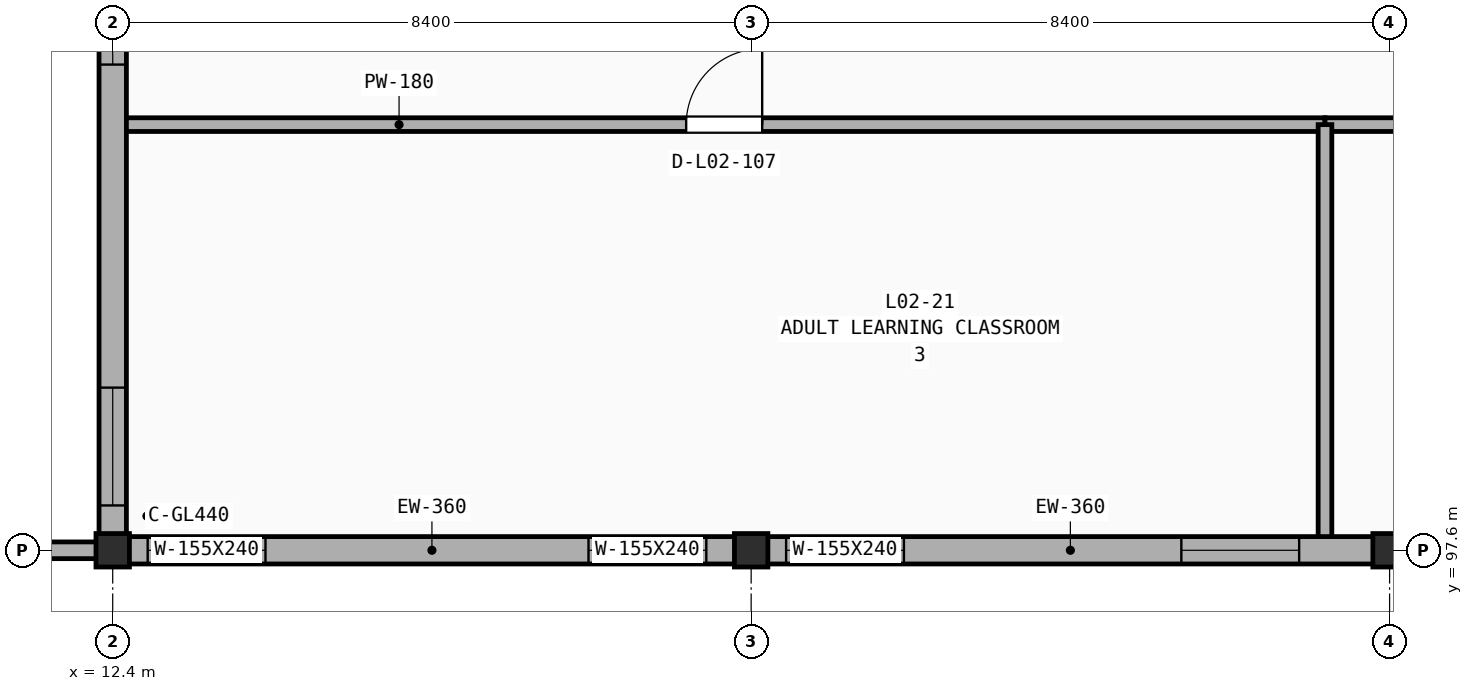
"""IFC4 building model, lengths in metres.
Left out: names, types, materials, properties, quantities, classifications, styles, units other than length and angle.
Written with IfcOpenShell. Run it as: python <this file> out.ifc"""

import sys

from ifc_helpers import new_model, si_unit, direction, frame, frame_2d, origin, origin_2d, place, context, subcontext, project, spatial, rectangle, extrude, element, fill, save


model = new_model("IFC4")
c1 = context("Model", 3, precision=1e-05, world=origin(), true_north=direction((0.0, 1.0)))
c2 = subcontext(c1, "Body", "Model", "MODEL_VIEW")
j1 = project(units=[si_unit("LENGTHUNIT", "METRE"), si_unit("PLANEANGLEUNIT", "RADIAN")], contexts=[c1])
p1 = place(None, origin())
s1 = spatial("IfcSite", under=j1, at=p1, CompositionType="ELEMENT")
p2 = place(p1, origin())
s2 = spatial("IfcBuilding", under=s1, at=p2, CompositionType="ELEMENT")
p3 = place(p2, frame((0.0, 0.0, 9.6)))
s3 = spatial("IfcBuildingStorey", under=s2, at=p3, CompositionType="ELEMENT", Elevation=9.6)
for number, where, z_axis, x_axis in (
    (1, (12.4, 97.6, 0.0), (0.0, 0.0, 1.0), (1.0, 0.0, 0.0)),
    (2, (20.8, 97.6, 0.0), (0.0, 0.0, 1.0), (1.0, 0.0, 0.0)),
    (3, (29.2, 97.6, 0.0), (0.0, 0.0, 1.0), (1.0, 0.0, 0.0)),
):
    element("IfcColumn", number, at=place(p3, frame(where, z_axis=z_axis, x_axis=x_axis)), inside=s3, PredefinedType="COLUMN", context=c2, shape_type="SweptSolid", body=[
        extrude(rectangle(XDim=0.44, YDim=0.44, at=origin_2d()), origin(), (0.0, 0.0, 1.0), 4.2),
    ])
p4 = place(p3, frame((12.54, 103.2, 0.0), z_axis=(0.0, 0.0, 1.0), x_axis=(1.0, 0.0, 0.0)))
e4 = element("IfcWall", 4, at=p4, inside=s3, PredefinedType="PARTITIONING", context=c2, shape_type="SweptSolid", body=[
    extrude(rectangle(XDim=15.81, YDim=0.18, at=frame_2d((7.905, 0.0))), origin(), (0.0, 0.0, 1.0), 3.39),
])
p5 = place(p4, frame((7.405, 0.0, -0.01)))
e5 = element("IfcOpeningElement", 5, at=p5, cuts=e4, PredefinedType="OPENING", context=c2, shape_type="SweptSolid", body=[
    extrude(rectangle(XDim=1.0, YDim=2.16, at=frame_2d((0.5, 1.08))), frame((0.0, 0.1, 0.0), z_axis=(0.0, -1.0, 0.0), x_axis=(1.0, 0.0, 0.0)), (0.0, 0.0, 1.0), 0.2),
])
p6 = place(p3, frame((28.35, 103.2, 0.0), z_axis=(0.0, 0.0, 1.0), x_axis=(1.0, 0.0, 0.0)))
e6 = element("IfcWall", 6, at=p6, inside=s3, PredefinedType="PARTITIONING", context=c2, shape_type="SweptSolid", body=[
    extrude(rectangle(XDim=16.0, YDim=0.18, at=frame_2d((8.0, 0.0))), origin(), (0.0, 0.0, 1.0), 3.45),
])
p7 = place(p6, frame((7.5, 0.0, -0.01)))
e7 = element("IfcOpeningElement", 7, at=p7, cuts=e6, PredefinedType="OPENING", context=c2, shape_type="SweptSolid", body=[
    extrude(rectangle(XDim=1.0, YDim=2.16, at=frame_2d((0.5, 1.08))), frame((0.0, 0.1, 0.0), z_axis=(0.0, -1.0, 0.0), x_axis=(1.0, 0.0, 0.0)), (0.0, 0.0, 1.0), 0.2),
])
p8 = place(p3, frame((28.35, 97.74, 0.0), z_axis=(0.0, 0.0, 1.0), x_axis=(0.0, 1.0, 0.0)))
e8 = element("IfcWall", 8, at=p8, inside=s3, PredefinedType="PARTITIONING", context=c2, shape_type="SweptSolid", body=[
    extrude(rectangle(XDim=5.46, YDim=0.18, at=frame_2d((2.73, 0.0))), origin(), (0.0, 0.0, 1.0), 3.31),
])
p9 = place(p3, frame((12.4, 97.6, 0.0), z_axis=(0.0, 0.0, 1.0), x_axis=(1.0, 0.0, 0.0)))
e9 = element("IfcWall", 9, at=p9, inside=s3, PredefinedType="SOLIDWALL", context=c2, shape_type="SweptSolid", body=[
    extrude(rectangle(XDim=8.4, YDim=0.36, at=frame_2d((4.2, 0.0))), origin(), (0.0, 0.0, 1.0), 3.31),
])
p10 = place(p9, frame((0.46, 0.0, 0.75)))
e10 = element("IfcOpeningElement", 10, at=p10, cuts=e9, PredefinedType="OPENING", context=c2, shape_type="SweptSolid", body=[
    extrude(rectangle(XDim=1.55, YDim=2.4, at=frame_2d((0.775, 1.2))), frame((0.0, 0.19, 0.0), z_axis=(0.0, -1.0, 0.0), x_axis=(1.0, 0.0, 0.0)), (0.0, 0.0, 1.0), 0.38),
])
p11 = place(p9, frame((6.26, 0.0, 0.75)))
e11 = element("IfcOpeningElement", 11, at=p11, cuts=e9, PredefinedType="OPENING", context=c2, shape_type="SweptSolid", body=[
    extrude(rectangle(XDim=1.55, YDim=2.4, at=frame_2d((0.775, 1.2))), frame((0.0, 0.19, 0.0), z_axis=(0.0, -1.0, 0.0), x_axis=(1.0, 0.0, 0.0)), (0.0, 0.0, 1.0), 0.38),
])
p12 = place(p3, frame((20.8, 97.6, 0.0), z_axis=(0.0, 0.0, 1.0), x_axis=(1.0, 0.0, 0.0)))
e12 = element("IfcWall", 12, at=p12, inside=s3, PredefinedType="SOLIDWALL", context=c2, shape_type="SweptSolid", body=[
    extrude(rectangle(XDim=8.4, YDim=0.36, at=frame_2d((4.2, 0.0))), origin(), (0.0, 0.0, 1.0), 3.31),
])
p13 = place(p12, frame((0.46, 0.0, 0.75)))
e13 = element("IfcOpeningElement", 13, at=p13, cuts=e12, PredefinedType="OPENING", context=c2, shape_type="SweptSolid", body=[
    extrude(rectangle(XDim=1.55, YDim=2.4, at=frame_2d((0.775, 1.2))), frame((0.0, 0.19, 0.0), z_axis=(0.0, -1.0, 0.0), x_axis=(1.0, 0.0, 0.0)), (0.0, 0.0, 1.0), 0.38),
])
p14 = place(p12, frame((5.66, 0.0, 0.75)))
e14 = element("IfcOpeningElement", 14, at=p14, cuts=e12, PredefinedType="OPENING", context=c2, shape_type="SweptSolid", body=[
    extrude(rectangle(XDim=1.55, YDim=2.4, at=frame_2d((0.775, 1.2))), frame((0.0, 0.19, 0.0), z_axis=(0.0, -1.0, 0.0), x_axis=(1.0, 0.0, 0.0)), (0.0, 0.0, 1.0), 0.38),
])
p15 = place(p3, frame((29.2, 97.6, 0.0), z_axis=(0.0, 0.0, 1.0), x_axis=(1.0, 0.0, 0.0)))
e15 = element("IfcWall", 15, at=p15, inside=s3, PredefinedType="SOLIDWALL", context=c2, shape_type="SweptSolid", body=[
    extrude(rectangle(XDim=8.4, YDim=0.36, at=frame_2d((4.2, 0.0))), origin(), (0.0, 0.0, 1.0), 3.31),
])
p16 = place(p15, frame((0.46, 0.0, 0.75)))
e16 = element("IfcOpeningElement", 16, at=p16, cuts=e15, PredefinedType="OPENING", context=c2, shape_type="SweptSolid", body=[
    extrude(rectangle(XDim=1.55, YDim=2.4, at=frame_2d((0.775, 1.2))), frame((0.0, 0.19, 0.0), z_axis=(0.0, -1.0, 0.0), x_axis=(1.0, 0.0, 0.0)), (0.0, 0.0, 1.0), 0.38),
])
p17 = place(p15, frame((6.26, 0.0, 0.75)))
e17 = element("IfcOpeningElement", 17, at=p17, cuts=e15, PredefinedType="OPENING", context=c2, shape_type="SweptSolid", body=[
    extrude(rectangle(XDim=1.55, YDim=2.4, at=frame_2d((0.775, 1.2))), frame((0.0, 0.19, 0.0), z_axis=(0.0, -1.0, 0.0), x_axis=(1.0, 0.0, 0.0)), (0.0, 0.0, 1.0), 0.38),
])
p18 = place(p3, frame((12.4, 106.0, 0.0), z_axis=(0.0, 0.0, 1.0), x_axis=(0.0, -1.0, 0.0)))
e18 = element("IfcWall", 18, at=p18, inside=s3, PredefinedType="SOLIDWALL", context=c2, shape_type="SweptSolid", body=[
    extrude(rectangle(XDim=8.4, YDim=0.36, at=frame_2d((4.2, 0.0))), origin(), (0.0, 0.0, 1.0), 3.31),
])
p19 = place(p18, frame((0.46, 0.0, 0.75)))
e19 = element("IfcOpeningElement", 19, at=p19, cuts=e18, PredefinedType="OPENING", context=c2, shape_type="SweptSolid", body=[
    extrude(rectangle(XDim=1.55, YDim=2.4, at=frame_2d((0.775, 1.2))), frame((0.0, 0.19, 0.0), z_axis=(0.0, -1.0, 0.0), x_axis=(1.0, 0.0, 0.0)), (0.0, 0.0, 1.0), 0.38),
])
p20 = place(p18, frame((6.26, 0.0, 0.75)))
e20 = element("IfcOpeningElement", 20, at=p20, cuts=e18, PredefinedType="OPENING", context=c2, shape_type="SweptSolid", body=[
    extrude(rectangle(XDim=1.55, YDim=2.4, at=frame_2d((0.775, 1.2))), frame((0.0, 0.19, 0.0), z_axis=(0.0, -1.0, 0.0), x_axis=(1.0, 0.0, 0.0)), (0.0, 0.0, 1.0), 0.38),
])
p21 = place(p3, frame((4.0, 97.6, 0.0), z_axis=(0.0, 0.0, 1.0), x_axis=(1.0, 0.0, 0.0)))
e21 = element("IfcWall", 21, at=p21, inside=s3, PredefinedType="PARAPET", context=c2, shape_type="SweptSolid", body=[
    extrude(rectangle(XDim=8.4, YDim=0.22, at=frame_2d((4.2, 0.0))), origin(), (0.0, 0.0, 1.0), 1.15),
])
p22 = place(p5, frame((0.0, 0.0, 0.01)))
e22 = element("IfcDoor", 22, at=p22, inside=s3, OperationType="SINGLE_SWING_RIGHT", PredefinedType="DOOR", context=c2, shape_type="SweptSolid", body=[
    extrude(rectangle(XDim=1.0, YDim=2.15, at=frame_2d((0.5, 1.075))), frame((0.0, 0.025, 0.0), z_axis=(0.0, -1.0, 0.0), x_axis=(1.0, 0.0, 0.0)), (0.0, 0.0, 1.0), 0.05),
])
fill(e5, e22)
p23 = place(p10, origin())
e23 = element("IfcWindow", 23, at=p23, inside=s3, PartitioningType="DOUBLE_PANEL_HORIZONTAL", PredefinedType="WINDOW", context=c2, shape_type="SweptSolid", body=[
    extrude(rectangle(XDim=1.55, YDim=2.4, at=frame_2d((0.775, 1.2))), frame((0.0, 0.03, 0.0), z_axis=(0.0, -1.0, 0.0), x_axis=(1.0, 0.0, 0.0)), (0.0, 0.0, 1.0), 0.06),
])
fill(e10, e23)
p24 = place(p11, origin())
e24 = element("IfcWindow", 24, at=p24, inside=s3, PartitioningType="DOUBLE_PANEL_HORIZONTAL", PredefinedType="WINDOW", context=c2, shape_type="SweptSolid", body=[
    extrude(rectangle(XDim=1.55, YDim=2.4, at=frame_2d((0.775, 1.2))), frame((0.0, 0.03, 0.0), z_axis=(0.0, -1.0, 0.0), x_axis=(1.0, 0.0, 0.0)), (0.0, 0.0, 1.0), 0.06),
])
fill(e11, e24)
p25 = place(p13, origin())
e25 = element("IfcWindow", 25, at=p25, inside=s3, PartitioningType="DOUBLE_PANEL_HORIZONTAL", PredefinedType="WINDOW", context=c2, shape_type="SweptSolid", body=[
    extrude(rectangle(XDim=1.55, YDim=2.4, at=frame_2d((0.775, 1.2))), frame((0.0, 0.03, 0.0), z_axis=(0.0, -1.0, 0.0), x_axis=(1.0, 0.0, 0.0)), (0.0, 0.0, 1.0), 0.06),
])
fill(e13, e25)
p26 = place(p14, origin())
e26 = element("IfcWindow", 26, at=p26, inside=s3, PartitioningType="DOUBLE_PANEL_HORIZONTAL", PredefinedType="WINDOW", context=c2, shape_type="SweptSolid", body=[
    extrude(rectangle(XDim=1.55, YDim=2.4, at=frame_2d((0.775, 1.2))), frame((0.0, 0.03, 0.0), z_axis=(0.0, -1.0, 0.0), x_axis=(1.0, 0.0, 0.0)), (0.0, 0.0, 1.0), 0.06),
])
fill(e14, e26)
p27 = place(p19, origin())
e27 = element("IfcWindow", 27, at=p27, inside=s3, PartitioningType="DOUBLE_PANEL_HORIZONTAL", PredefinedType="WINDOW", context=c2, shape_type="SweptSolid", body=[
    extrude(rectangle(XDim=1.55, YDim=2.4, at=frame_2d((0.775, 1.2))), frame((0.0, 0.03, 0.0), z_axis=(0.0, -1.0, 0.0), x_axis=(1.0, 0.0, 0.0)), (0.0, 0.0, 1.0), 0.06),
])
fill(e19, e27)
p28 = place(p20, origin())
e28 = element("IfcWindow", 28, at=p28, inside=s3, PartitioningType="DOUBLE_PANEL_HORIZONTAL", PredefinedType="WINDOW", context=c2, shape_type="SweptSolid", body=[
    extrude(rectangle(XDim=1.55, YDim=2.4, at=frame_2d((0.775, 1.2))), frame((0.0, 0.03, 0.0), z_axis=(0.0, -1.0, 0.0), x_axis=(1.0, 0.0, 0.0)), (0.0, 0.0, 1.0), 0.06),
])
fill(e20, e28)
save(model, sys.argv[1])
